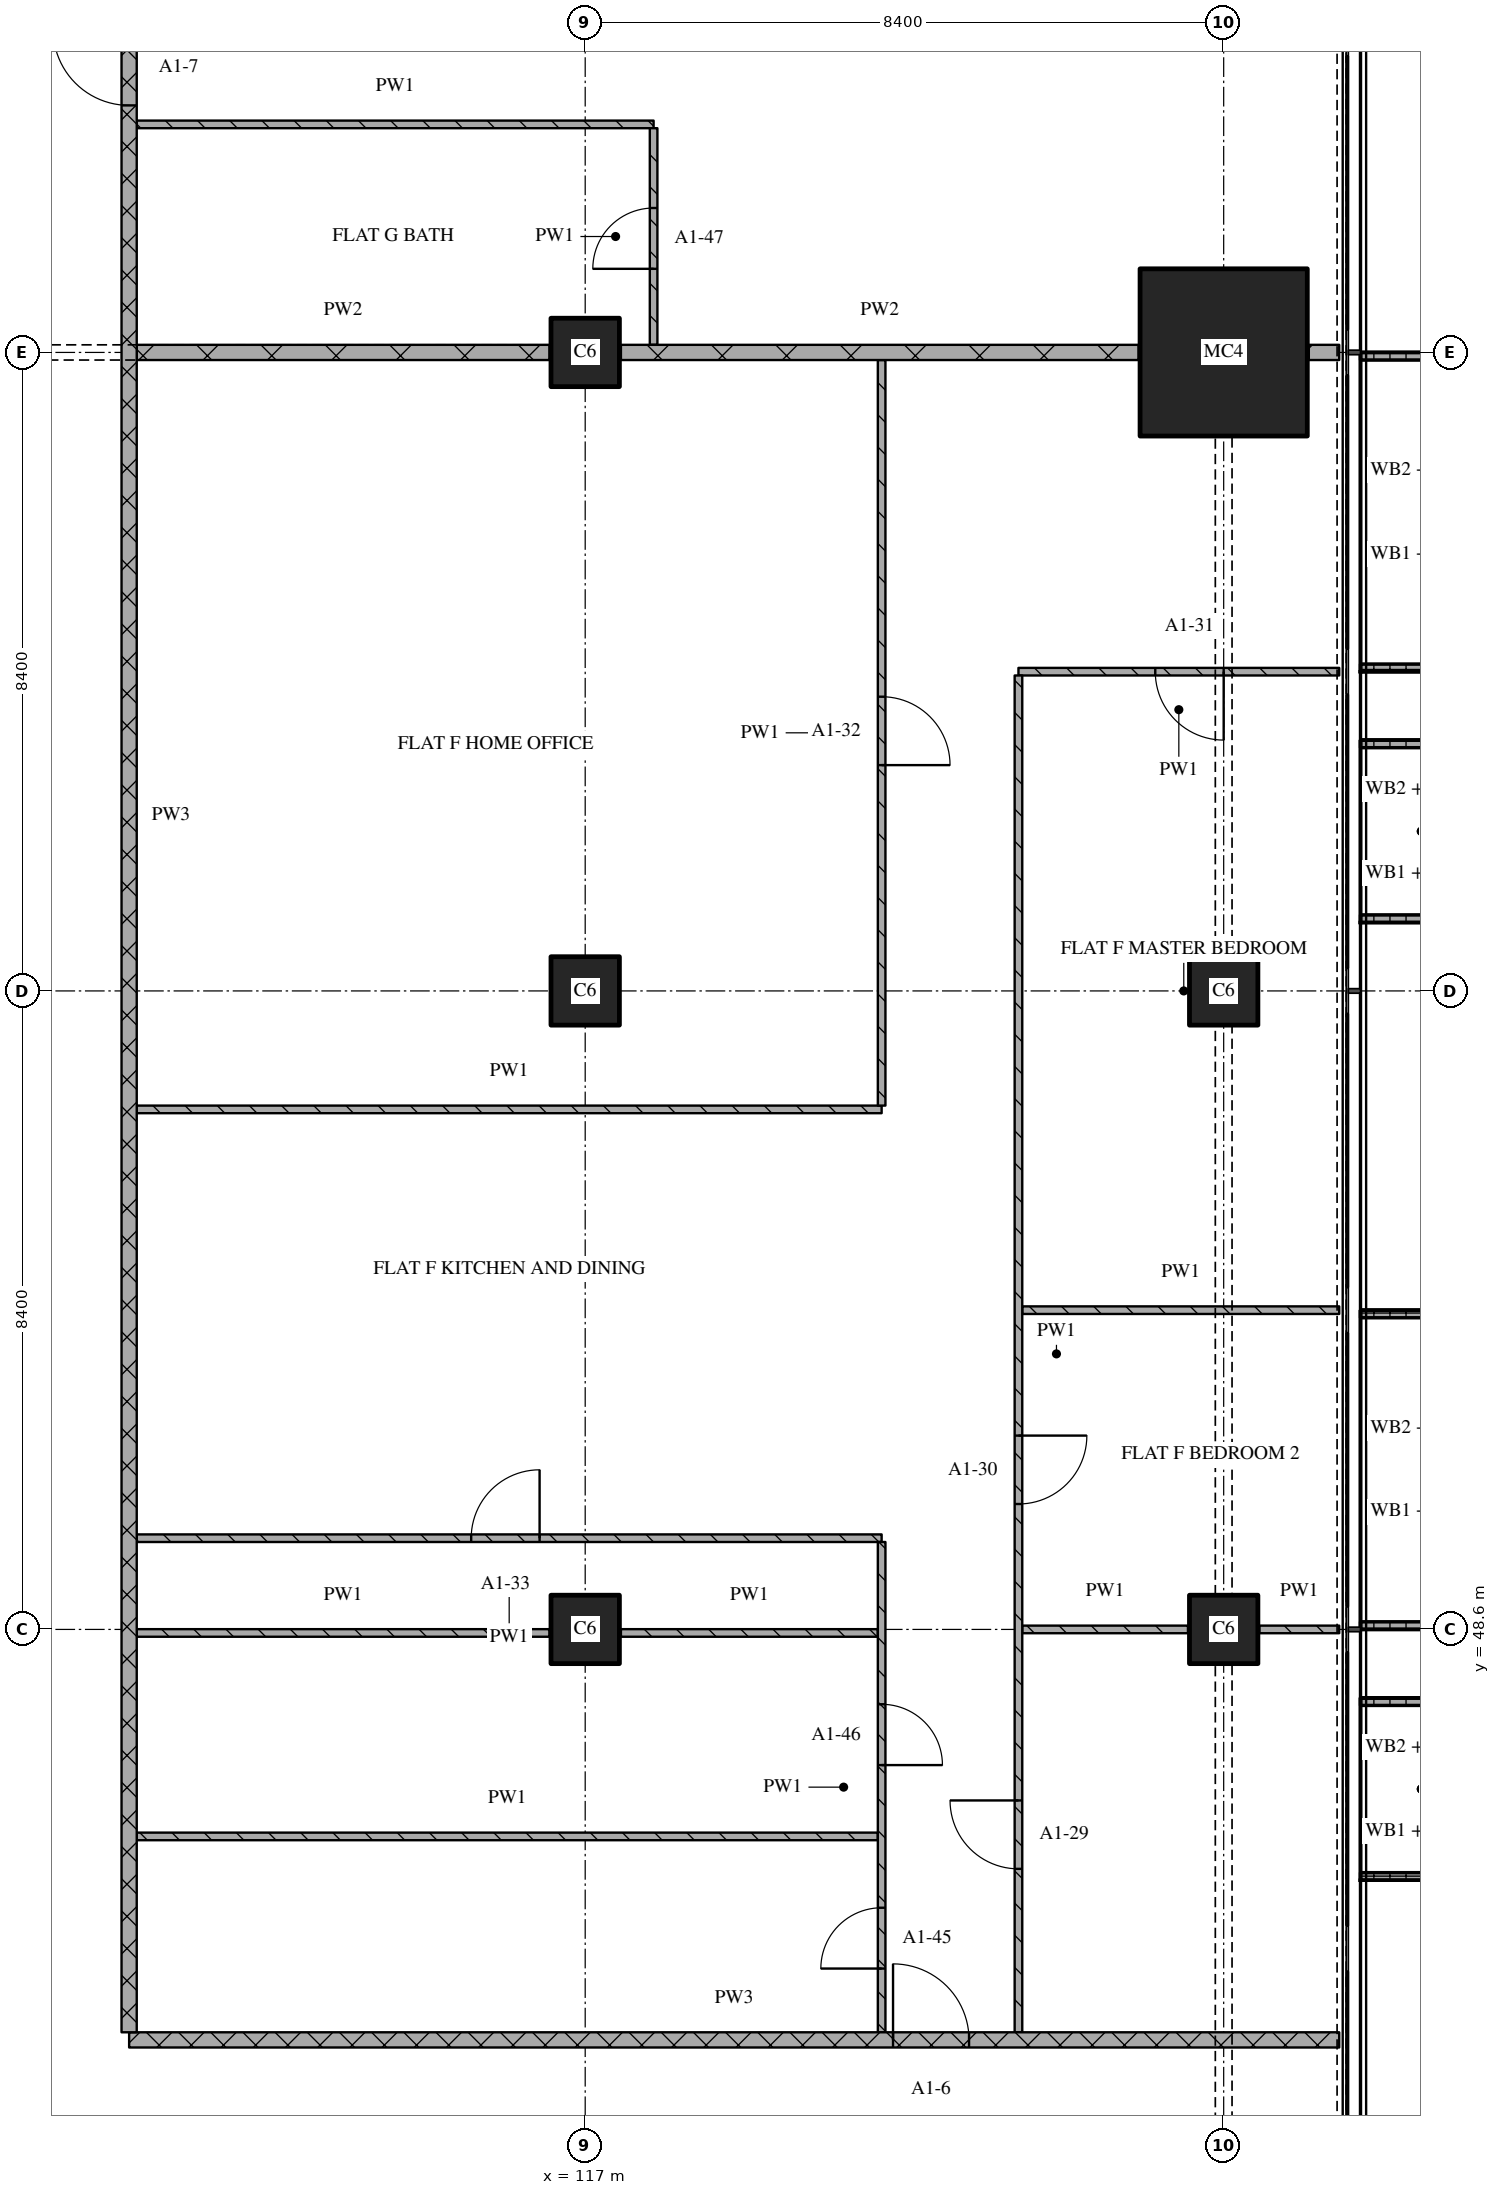
"""IFC4 building model, lengths in metres.
Left out: names, types, materials, properties, quantities, classifications, styles, units other than length and angle.
Written with IfcOpenShell. Run it as: python <this file> out.ifc"""

import sys

from ifc_helpers import new_model, si_unit, direction, frame, frame_2d, origin, origin_2d, place, context, subcontext, project, spatial, polyline, rectangle, outline, extrude, element, fill, save


model = new_model("IFC4")
c1 = context("Model", 3, precision=1e-05, world=origin(), true_north=direction((0.0, 1.0)))
c2 = subcontext(c1, "Body", "Model", "MODEL_VIEW")
j1 = project(units=[si_unit("LENGTHUNIT", "METRE"), si_unit("PLANEANGLEUNIT", "RADIAN")], contexts=[c1])
p1 = place(None, origin())
s1 = spatial("IfcSite", under=j1, at=p1, CompositionType="ELEMENT")
p2 = place(p1, origin())
s2 = spatial("IfcBuilding", under=s1, at=p2, CompositionType="ELEMENT")
p3 = place(p2, frame((0.0, 0.0, 44.4)))
s3 = spatial("IfcBuildingStorey", under=s2, at=p3, CompositionType="ELEMENT", Elevation=44.4)
for number, where, z_axis, x_axis in (
    (1, (117.0, 48.6, 0.0), (0.0, 0.0, 1.0), (1.0, 0.0, 0.0)),
    (2, (117.0, 57.0, 0.0), (0.0, 0.0, 1.0), (1.0, 0.0, 0.0)),
    (3, (117.0, 65.4, 0.0), (0.0, 0.0, 1.0), (1.0, 0.0, 0.0)),
    (4, (125.4, 48.6, 0.0), (0.0, 0.0, 1.0), (1.0, 0.0, 0.0)),
    (5, (125.4, 57.0, 0.0), (0.0, 0.0, 1.0), (1.0, 0.0, 0.0)),
):
    element("IfcColumn", number, at=place(p3, frame(where, z_axis=z_axis, x_axis=x_axis)), inside=s3, PredefinedType="COLUMN", context=c2, shape_type="SweptSolid", body=[
        extrude(rectangle(XDim=0.9, YDim=0.9, at=origin_2d()), origin(), (0.0, 0.0, 1.0), 3.6),
    ])
p4 = place(p3, frame((125.4, 65.4, 0.0), z_axis=(0.0, 0.0, 1.0), x_axis=(1.0, 0.0, 0.0)))
e6 = element("IfcColumn", 6, at=p4, inside=s3, PredefinedType="COLUMN", context=c2, shape_type="SweptSolid", body=[
    extrude(rectangle(XDim=2.2, YDim=2.2, at=origin_2d()), origin(), (0.0, 0.0, 1.0), 3.6),
])
p5 = place(p3, origin())
e7 = element("IfcWall", 7, at=p5, inside=s3, PredefinedType="SOLIDWALL", context=c2, shape_type="SweptSolid", body=[
    extrude(outline(polyline([(127.2, 45.3), (127.2, 45.4), (128.7, 45.4), (128.7, 47.6), (127.2, 47.6), (127.2, 47.7), (128.8, 47.7), (128.8, 45.3), (127.2, 45.3)])), origin(), (0.0, 0.0, 1.0), 1.0),
])
p6 = place(p3, origin())
e8 = element("IfcWall", 8, at=p6, inside=s3, PredefinedType="SOLIDWALL", context=c2, shape_type="SweptSolid", body=[
    extrude(outline(polyline([(127.2, 48.6), (127.2, 48.7), (128.833, 48.7), (128.833, 52.7), (127.2, 52.7), (127.2, 52.8), (128.933, 52.8), (128.933, 48.6), (127.2, 48.6)])), origin(), (0.0, 0.0, 1.0), 1.0),
])
p7 = place(p3, origin())
e9 = element("IfcWall", 9, at=p7, inside=s3, PredefinedType="SOLIDWALL", context=c2, shape_type="SweptSolid", body=[
    extrude(outline(polyline([(127.2, 57.9), (127.2, 58.0), (128.7, 58.0), (128.7, 60.2), (127.2, 60.2), (127.2, 60.3), (128.8, 60.3), (128.8, 57.9), (127.2, 57.9)])), origin(), (0.0, 0.0, 1.0), 1.0),
])
p8 = place(p3, origin())
e10 = element("IfcWall", 10, at=p8, inside=s3, PredefinedType="SOLIDWALL", context=c2, shape_type="SweptSolid", body=[
    extrude(outline(polyline([(127.2, 61.2), (127.2, 61.3), (128.833, 61.3), (128.833, 65.3), (127.2, 65.3), (127.2, 65.4), (128.933, 65.4), (128.933, 61.2), (127.2, 61.2)])), origin(), (0.0, 0.0, 1.0), 1.0),
])
p9 = place(p3, frame((111.0, 43.2, 0.0), z_axis=(0.0, 0.0, 1.0), x_axis=(1.0, 0.0, 0.0)))
e11 = element("IfcWall", 11, at=p9, inside=s3, PredefinedType="PARTITIONING", context=c2, shape_type="SweptSolid", body=[
    extrude(rectangle(XDim=15.92, YDim=0.2, at=frame_2d((7.96, 0.0))), origin(), (0.0, 0.0, 1.0), 3.32),
])
p10 = place(p9, frame((10.05, 0.0, 0.0)))
e12 = element("IfcOpeningElement", 12, at=p10, cuts=e11, PredefinedType="OPENING", context=c2, shape_type="SweptSolid", body=[
    extrude(rectangle(XDim=1.0, YDim=2.1, at=frame_2d((0.5, 1.05))), frame((0.0, 0.11, 0.0), z_axis=(0.0, -1.0, 0.0), x_axis=(1.0, 0.0, 0.0)), (0.0, 0.0, 1.0), 0.22),
])
p11 = place(p3, frame((111.1, 45.877, 0.0), z_axis=(0.0, 0.0, 1.0), x_axis=(1.0, 0.0, 0.0)))
e13 = element("IfcWall", 13, at=p11, inside=s3, PredefinedType="PARTITIONING", context=c2, shape_type="SweptSolid", body=[
    extrude(rectangle(XDim=9.75, YDim=0.1, at=frame_2d((4.875, 0.0))), origin(), (0.0, 0.0, 1.0), 3.32),
])
p12 = place(p3, frame((111.1, 48.553, 0.0), z_axis=(0.0, 0.0, 1.0), x_axis=(1.0, 0.0, 0.0)))
e14 = element("IfcWall", 14, at=p12, inside=s3, PredefinedType="PARTITIONING", context=c2, shape_type="SweptSolid", body=[
    extrude(rectangle(XDim=5.43, YDim=0.1, at=frame_2d((2.715, 0.0))), origin(), (0.0, 0.0, 1.0), 3.32),
])
p13 = place(p3, frame((117.47, 48.553, 0.0), z_axis=(0.0, 0.0, 1.0), x_axis=(1.0, 0.0, 0.0)))
e15 = element("IfcWall", 15, at=p13, inside=s3, PredefinedType="PARTITIONING", context=c2, shape_type="SweptSolid", body=[
    extrude(rectangle(XDim=3.38, YDim=0.1, at=frame_2d((1.69, 0.0))), origin(), (0.0, 0.0, 1.0), 3.32),
])
p14 = place(p3, frame((122.75, 48.6, 0.0), z_axis=(0.0, 0.0, 1.0), x_axis=(1.0, 0.0, 0.0)))
e16 = element("IfcWall", 16, at=p14, inside=s3, PredefinedType="PARTITIONING", context=c2, shape_type="SweptSolid", body=[
    extrude(rectangle(XDim=2.18, YDim=0.1, at=frame_2d((1.09, 0.0))), origin(), (0.0, 0.0, 1.0), 3.32),
])
p15 = place(p3, frame((125.87, 48.6, 0.0), z_axis=(0.0, 0.0, 1.0), x_axis=(1.0, 0.0, 0.0)))
e17 = element("IfcWall", 17, at=p15, inside=s3, PredefinedType="PARTITIONING", context=c2, shape_type="SweptSolid", body=[
    extrude(rectangle(XDim=1.05, YDim=0.1, at=frame_2d((0.525, 0.0))), origin(), (0.0, 0.0, 1.0), 3.32),
])
p16 = place(p3, frame((120.9, 49.8, 0.0), z_axis=(0.0, 0.0, 1.0), x_axis=(-1.0, 0.0, 0.0)))
e18 = element("IfcWall", 18, at=p16, inside=s3, PredefinedType="PARTITIONING", context=c2, shape_type="SweptSolid", body=[
    extrude(rectangle(XDim=9.8, YDim=0.1, at=frame_2d((4.9, 0.0))), origin(), (0.0, 0.0, 1.0), 3.32),
])
p17 = place(p16, frame((4.5, 0.0, 0.0)))
e19 = element("IfcOpeningElement", 19, at=p17, cuts=e18, PredefinedType="OPENING", context=c2, shape_type="SweptSolid", body=[
    extrude(rectangle(XDim=0.9, YDim=2.1, at=frame_2d((0.45, 1.05))), frame((0.0, 0.06, 0.0), z_axis=(0.0, -1.0, 0.0), x_axis=(1.0, 0.0, 0.0)), (0.0, 0.0, 1.0), 0.12),
])
p18 = place(p3, frame((122.75, 52.8, 0.0), z_axis=(0.0, 0.0, 1.0), x_axis=(1.0, 0.0, 0.0)))
e20 = element("IfcWall", 20, at=p18, inside=s3, PredefinedType="PARTITIONING", context=c2, shape_type="SweptSolid", body=[
    extrude(rectangle(XDim=4.17, YDim=0.1, at=frame_2d((2.085, 0.0))), origin(), (0.0, 0.0, 1.0), 3.32),
])
p19 = place(p3, frame((111.1, 55.441, 0.0), z_axis=(0.0, 0.0, 1.0), x_axis=(1.0, 0.0, 0.0)))
e21 = element("IfcWall", 21, at=p19, inside=s3, PredefinedType="PARTITIONING", context=c2, shape_type="SweptSolid", body=[
    extrude(rectangle(XDim=9.8, YDim=0.1, at=frame_2d((4.9, 0.0))), origin(), (0.0, 0.0, 1.0), 3.32),
])
p20 = place(p3, frame((126.92, 61.2, 0.0), z_axis=(0.0, 0.0, 1.0), x_axis=(-1.0, 0.0, 0.0)))
e22 = element("IfcWall", 22, at=p20, inside=s3, PredefinedType="PARTITIONING", context=c2, shape_type="SweptSolid", body=[
    extrude(rectangle(XDim=4.22, YDim=0.1, at=frame_2d((2.11, 0.0))), origin(), (0.0, 0.0, 1.0), 3.32),
])
p21 = place(p20, frame((1.52, 0.0, 0.0)))
e23 = element("IfcOpeningElement", 23, at=p21, cuts=e22, PredefinedType="OPENING", context=c2, shape_type="SweptSolid", body=[
    extrude(rectangle(XDim=0.9, YDim=2.1, at=frame_2d((0.45, 1.05))), frame((0.0, 0.06, 0.0), z_axis=(0.0, -1.0, 0.0), x_axis=(1.0, 0.0, 0.0)), (0.0, 0.0, 1.0), 0.12),
])
p22 = place(p3, frame((111.1, 65.4, 0.0), z_axis=(0.0, 0.0, 1.0), x_axis=(1.0, 0.0, 0.0)))
e24 = element("IfcWall", 24, at=p22, inside=s3, PredefinedType="PARTITIONING", context=c2, shape_type="SweptSolid", body=[
    extrude(rectangle(XDim=5.43, YDim=0.2, at=frame_2d((2.715, 0.0))), origin(), (0.0, 0.0, 1.0), 2.82),
])
p23 = place(p3, frame((117.47, 65.4, 0.0), z_axis=(0.0, 0.0, 1.0), x_axis=(1.0, 0.0, 0.0)))
e25 = element("IfcWall", 25, at=p23, inside=s3, PredefinedType="PARTITIONING", context=c2, shape_type="SweptSolid", body=[
    extrude(rectangle(XDim=6.81, YDim=0.2, at=frame_2d((3.405, 0.0))), origin(), (0.0, 0.0, 1.0), 3.32),
])
p24 = place(p3, frame((126.52, 65.4, 0.0), z_axis=(0.0, 0.0, 1.0), x_axis=(1.0, 0.0, 0.0)))
e26 = element("IfcWall", 26, at=p24, inside=s3, PredefinedType="PARTITIONING", context=c2, shape_type="SweptSolid", body=[
    extrude(rectangle(XDim=0.4, YDim=0.2, at=frame_2d((0.2, 0.0))), origin(), (0.0, 0.0, 1.0), 3.32),
])
p25 = place(p3, frame((111.1, 68.4, 0.0), z_axis=(0.0, 0.0, 1.0), x_axis=(1.0, 0.0, 0.0)))
e27 = element("IfcWall", 27, at=p25, inside=s3, PredefinedType="PARTITIONING", context=c2, shape_type="SweptSolid", body=[
    extrude(rectangle(XDim=6.8, YDim=0.1, at=frame_2d((3.4, 0.0))), origin(), (0.0, 0.0, 1.0), 3.32),
])
p26 = place(p3, frame((111.0, 75.32, 0.0), z_axis=(0.0, 0.0, 1.0), x_axis=(0.0, -1.0, 0.0)))
e28 = element("IfcWall", 28, at=p26, inside=s3, PredefinedType="PARTITIONING", context=c2, shape_type="SweptSolid", body=[
    extrude(rectangle(XDim=32.02, YDim=0.2, at=frame_2d((16.01, 0.0))), origin(), (0.0, 0.0, 1.0), 3.32),
])
p27 = place(p26, frame((5.67, 0.0, 0.0)))
e29 = element("IfcOpeningElement", 29, at=p27, cuts=e28, PredefinedType="OPENING", context=c2, shape_type="SweptSolid", body=[
    extrude(rectangle(XDim=1.0, YDim=2.1, at=frame_2d((0.5, 1.05))), frame((0.0, 0.11, 0.0), z_axis=(0.0, -1.0, 0.0), x_axis=(1.0, 0.0, 0.0)), (0.0, 0.0, 1.0), 0.22),
])
p28 = place(p3, frame((117.9, 65.5, 0.0), z_axis=(0.0, 0.0, 1.0), x_axis=(0.0, 1.0, 0.0)))
e30 = element("IfcWall", 30, at=p28, inside=s3, PredefinedType="PARTITIONING", context=c2, shape_type="SweptSolid", body=[
    extrude(rectangle(XDim=2.85, YDim=0.1, at=frame_2d((1.425, 0.0))), origin(), (0.0, 0.0, 1.0), 3.32),
])
p29 = place(p28, frame((1.0, 0.0, 0.0)))
e31 = element("IfcOpeningElement", 31, at=p29, cuts=e30, PredefinedType="OPENING", context=c2, shape_type="SweptSolid", body=[
    extrude(rectangle(XDim=0.8, YDim=2.1, at=frame_2d((0.4, 1.05))), frame((0.0, 0.06, 0.0), z_axis=(0.0, -1.0, 0.0), x_axis=(1.0, 0.0, 0.0)), (0.0, 0.0, 1.0), 0.12),
])
p30 = place(p3, frame((120.9, 43.3, 0.0), z_axis=(0.0, 0.0, 1.0), x_axis=(0.0, 1.0, 0.0)))
e32 = element("IfcWall", 32, at=p30, inside=s3, PredefinedType="PARTITIONING", context=c2, shape_type="SweptSolid", body=[
    extrude(rectangle(XDim=6.45, YDim=0.1, at=frame_2d((3.225, 0.0))), origin(), (0.0, 0.0, 1.0), 3.32),
])
p31 = place(p30, frame((0.838, 0.0, 0.0)))
e33 = element("IfcOpeningElement", 33, at=p31, cuts=e32, PredefinedType="OPENING", context=c2, shape_type="SweptSolid", body=[
    extrude(rectangle(XDim=0.8, YDim=2.1, at=frame_2d((0.4, 1.05))), frame((0.0, 0.06, 0.0), z_axis=(0.0, -1.0, 0.0), x_axis=(1.0, 0.0, 0.0)), (0.0, 0.0, 1.0), 0.12),
])
p32 = place(p30, frame((3.515, 0.0, 0.0)))
e34 = element("IfcOpeningElement", 34, at=p32, cuts=e32, PredefinedType="OPENING", context=c2, shape_type="SweptSolid", body=[
    extrude(rectangle(XDim=0.8, YDim=2.1, at=frame_2d((0.4, 1.05))), frame((0.0, 0.06, 0.0), z_axis=(0.0, -1.0, 0.0), x_axis=(1.0, 0.0, 0.0)), (0.0, 0.0, 1.0), 0.12),
])
p33 = place(p3, frame((120.9, 55.491, 0.0), z_axis=(0.0, 0.0, 1.0), x_axis=(0.0, 1.0, 0.0)))
e35 = element("IfcWall", 35, at=p33, inside=s3, PredefinedType="PARTITIONING", context=c2, shape_type="SweptSolid", body=[
    extrude(rectangle(XDim=9.809, YDim=0.1, at=frame_2d((4.904, 0.0))), origin(), (0.0, 0.0, 1.0), 3.32),
])
p34 = place(p33, frame((4.479, 0.0, 0.0)))
e36 = element("IfcOpeningElement", 36, at=p34, cuts=e35, PredefinedType="OPENING", context=c2, shape_type="SweptSolid", body=[
    extrude(rectangle(XDim=0.9, YDim=2.1, at=frame_2d((0.45, 1.05))), frame((0.0, 0.06, 0.0), z_axis=(0.0, -1.0, 0.0), x_axis=(1.0, 0.0, 0.0)), (0.0, 0.0, 1.0), 0.12),
])
p35 = place(p3, frame((122.7, 61.15, 0.0), z_axis=(0.0, 0.0, 1.0), x_axis=(0.0, -1.0, 0.0)))
e37 = element("IfcWall", 37, at=p35, inside=s3, PredefinedType="PARTITIONING", context=c2, shape_type="SweptSolid", body=[
    extrude(rectangle(XDim=17.85, YDim=0.1, at=frame_2d((8.925, 0.0))), origin(), (0.0, 0.0, 1.0), 3.32),
])
p36 = place(p35, frame((10.0, 0.0, 0.0)))
e38 = element("IfcOpeningElement", 38, at=p36, cuts=e37, PredefinedType="OPENING", context=c2, shape_type="SweptSolid", body=[
    extrude(rectangle(XDim=0.9, YDim=2.1, at=frame_2d((0.45, 1.05))), frame((0.0, 0.06, 0.0), z_axis=(0.0, -1.0, 0.0), x_axis=(1.0, 0.0, 0.0)), (0.0, 0.0, 1.0), 0.12),
])
p37 = place(p35, frame((14.8, 0.0, 0.0)))
e39 = element("IfcOpeningElement", 39, at=p37, cuts=e37, PredefinedType="OPENING", context=c2, shape_type="SweptSolid", body=[
    extrude(rectangle(XDim=0.9, YDim=2.1, at=frame_2d((0.45, 1.05))), frame((0.0, 0.06, 0.0), z_axis=(0.0, -1.0, 0.0), x_axis=(1.0, 0.0, 0.0)), (0.0, 0.0, 1.0), 0.12),
])
p38 = place(p10, origin())
e40 = element("IfcDoor", 40, at=p38, inside=s3, OperationType="SINGLE_SWING_LEFT", PredefinedType="DOOR", context=c2, shape_type="SweptSolid", body=[
    extrude(rectangle(XDim=1.0, YDim=2.1, at=frame_2d((0.5, 1.05))), frame((0.0, 0.025, 0.0), z_axis=(0.0, -1.0, 0.0), x_axis=(1.0, 0.0, 0.0)), (0.0, 0.0, 1.0), 0.05),
])
fill(e12, e40)
p39 = place(p17, origin())
e41 = element("IfcDoor", 41, at=p39, inside=s3, OperationType="SINGLE_SWING_RIGHT", PredefinedType="DOOR", context=c2, shape_type="SweptSolid", body=[
    extrude(rectangle(XDim=0.9, YDim=2.1, at=frame_2d((0.45, 1.05))), frame((0.0, 0.025, 0.0), z_axis=(0.0, -1.0, 0.0), x_axis=(1.0, 0.0, 0.0)), (0.0, 0.0, 1.0), 0.05),
])
fill(e19, e41)
p40 = place(p21, origin())
e42 = element("IfcDoor", 42, at=p40, inside=s3, OperationType="SINGLE_SWING_LEFT", PredefinedType="DOOR", context=c2, shape_type="SweptSolid", body=[
    extrude(rectangle(XDim=0.9, YDim=2.1, at=frame_2d((0.45, 1.05))), frame((0.0, 0.025, 0.0), z_axis=(0.0, -1.0, 0.0), x_axis=(1.0, 0.0, 0.0)), (0.0, 0.0, 1.0), 0.05),
])
fill(e23, e42)
p41 = place(p27, origin())
e43 = element("IfcDoor", 43, at=p41, inside=s3, OperationType="SINGLE_SWING_RIGHT", PredefinedType="DOOR", context=c2, shape_type="SweptSolid", body=[
    extrude(rectangle(XDim=1.0, YDim=2.1, at=frame_2d((0.5, 1.05))), frame((0.0, 0.025, 0.0), z_axis=(0.0, -1.0, 0.0), x_axis=(1.0, 0.0, 0.0)), (0.0, 0.0, 1.0), 0.05),
])
fill(e29, e43)
p42 = place(p29, origin())
e44 = element("IfcDoor", 44, at=p42, inside=s3, OperationType="SINGLE_SWING_LEFT", PredefinedType="DOOR", context=c2, shape_type="SweptSolid", body=[
    extrude(rectangle(XDim=0.8, YDim=2.1, at=frame_2d((0.4, 1.05))), frame((0.0, 0.025, 0.0), z_axis=(0.0, -1.0, 0.0), x_axis=(1.0, 0.0, 0.0)), (0.0, 0.0, 1.0), 0.05),
])
fill(e31, e44)
p43 = place(p31, origin())
e45 = element("IfcDoor", 45, at=p43, inside=s3, OperationType="SINGLE_SWING_LEFT", PredefinedType="DOOR", context=c2, shape_type="SweptSolid", body=[
    extrude(rectangle(XDim=0.8, YDim=2.1, at=frame_2d((0.4, 1.05))), frame((0.0, 0.025, 0.0), z_axis=(0.0, -1.0, 0.0), x_axis=(1.0, 0.0, 0.0)), (0.0, 0.0, 1.0), 0.05),
])
fill(e33, e45)
p44 = place(p32, origin())
e46 = element("IfcDoor", 46, at=p44, inside=s3, OperationType="SINGLE_SWING_RIGHT", PredefinedType="DOOR", context=c2, shape_type="SweptSolid", body=[
    extrude(rectangle(XDim=0.8, YDim=2.1, at=frame_2d((0.4, 1.05))), frame((0.0, 0.025, 0.0), z_axis=(0.0, -1.0, 0.0), x_axis=(1.0, 0.0, 0.0)), (0.0, 0.0, 1.0), 0.05),
])
fill(e34, e46)
p45 = place(p34, origin())
e47 = element("IfcDoor", 47, at=p45, inside=s3, OperationType="SINGLE_SWING_RIGHT", PredefinedType="DOOR", context=c2, shape_type="SweptSolid", body=[
    extrude(rectangle(XDim=0.9, YDim=2.1, at=frame_2d((0.45, 1.05))), frame((0.0, 0.025, 0.0), z_axis=(0.0, -1.0, 0.0), x_axis=(1.0, 0.0, 0.0)), (0.0, 0.0, 1.0), 0.05),
])
fill(e36, e47)
p46 = place(p36, origin())
e48 = element("IfcDoor", 48, at=p46, inside=s3, OperationType="SINGLE_SWING_LEFT", PredefinedType="DOOR", context=c2, shape_type="SweptSolid", body=[
    extrude(rectangle(XDim=0.9, YDim=2.1, at=frame_2d((0.45, 1.05))), frame((0.0, 0.025, 0.0), z_axis=(0.0, -1.0, 0.0), x_axis=(1.0, 0.0, 0.0)), (0.0, 0.0, 1.0), 0.05),
])
fill(e38, e48)
p47 = place(p37, origin())
e49 = element("IfcDoor", 49, at=p47, inside=s3, OperationType="SINGLE_SWING_RIGHT", PredefinedType="DOOR", context=c2, shape_type="SweptSolid", body=[
    extrude(rectangle(XDim=0.9, YDim=2.1, at=frame_2d((0.45, 1.05))), frame((0.0, 0.025, 0.0), z_axis=(0.0, -1.0, 0.0), x_axis=(1.0, 0.0, 0.0)), (0.0, 0.0, 1.0), 0.05),
])
fill(e39, e49)
save(model, sys.argv[1])
